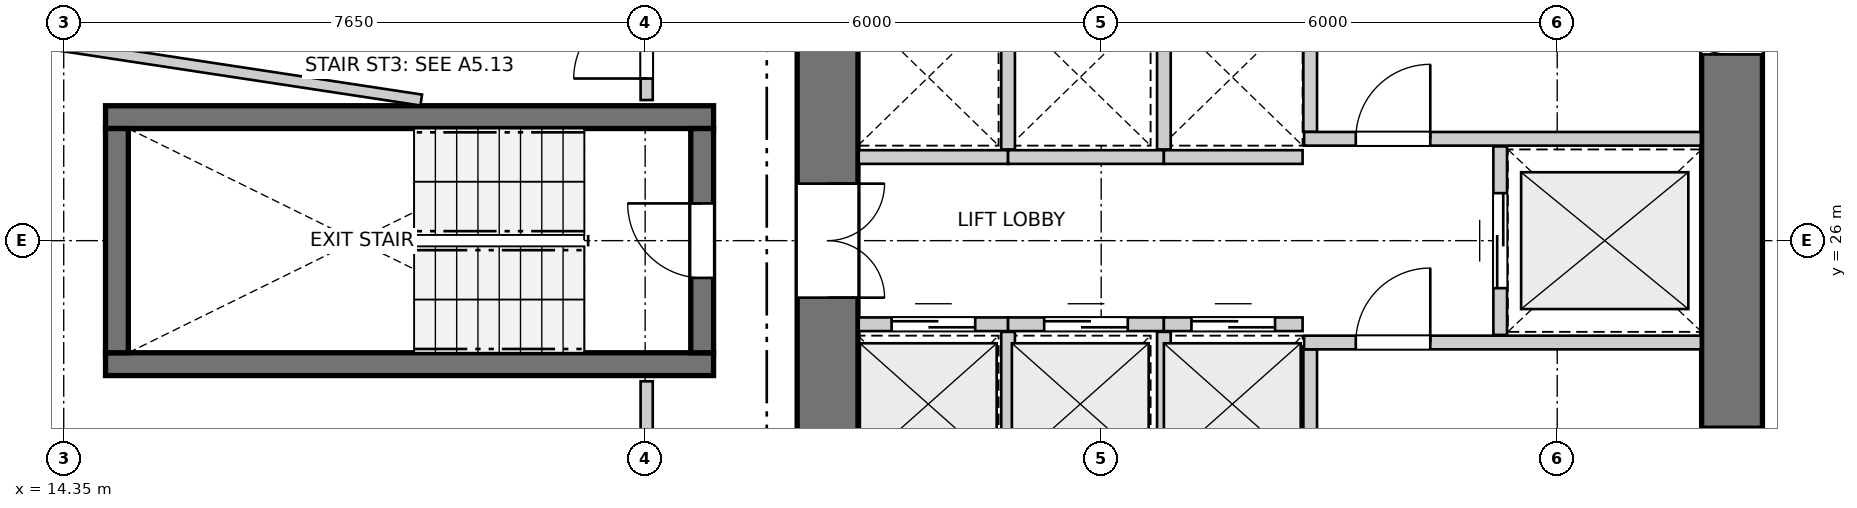
"""IFC4 building model, lengths in metres.
Left out: names, types, materials, properties, quantities, classifications, styles, units other than length and angle.
Written with IfcOpenShell. Run it as: python <this file> out.ifc"""

import sys

from ifc_helpers import new_model, si_unit, direction, frame, frame_2d, origin, place, context, subcontext, project, spatial, rectangle, extrude, source, transform, mapped, element, fill, save


model = new_model("IFC4")
c1 = context("Model", 3, precision=1e-05, world=origin(), true_north=direction((0.0, 1.0)))
c2 = subcontext(c1, "Body", "Model", "MODEL_VIEW")
j1 = project(units=[si_unit("LENGTHUNIT", "METRE"), si_unit("PLANEANGLEUNIT", "RADIAN")], contexts=[c1])
p1 = place(None, origin())
s1 = spatial("IfcSite", under=j1, at=p1, CompositionType="ELEMENT")
p2 = place(p1, origin())
s2 = spatial("IfcBuilding", under=s1, at=p2, CompositionType="ELEMENT")
p3 = place(p2, frame((0.0, 0.0, 62.2)))
s3 = spatial("IfcBuildingStorey", under=s2, at=p3, CompositionType="ELEMENT", Elevation=62.2)
p4 = place(p3, frame((24.4, 33.8, 0.0), z_axis=(0.0, 0.0, 1.0), x_axis=(0.0, -1.0, 0.0)))
e1 = element("IfcWall", 1, at=p4, inside=s3, PredefinedType="SHEAR", context=c2, shape_type="SweptSolid", body=[
    extrude(rectangle(XDim=15.6, YDim=0.8, at=frame_2d((7.8, 0.0))), origin(), (0.0, 0.0, 1.0), 2.9),
])
p5 = place(p4, frame((7.05, 0.0, 0.0)))
e2 = element("IfcOpeningElement", 2, at=p5, cuts=e1, PredefinedType="OPENING", context=c2, shape_type="SweptSolid", body=[
    extrude(rectangle(XDim=1.5, YDim=2.15, at=frame_2d((0.75, 1.075))), frame((0.0, 0.41, 0.0), z_axis=(0.0, -1.0, 0.0), x_axis=(1.0, 0.0, 0.0)), (0.0, 0.0, 1.0), 0.82),
])
p6 = place(p4, frame((3.52, 0.0, 0.0)))
e3 = element("IfcOpeningElement", 3, at=p6, cuts=e1, PredefinedType="OPENING", context=c2, shape_type="SweptSolid", body=[
    extrude(rectangle(XDim=0.86, YDim=2.05, at=frame_2d((0.43, 1.025))), frame((0.0, 0.41, 0.0), z_axis=(0.0, -1.0, 0.0), x_axis=(1.0, 0.0, 0.0)), (0.0, 0.0, 1.0), 0.82),
])
p7 = place(p4, frame((11.22, 0.0, 0.0)))
e4 = element("IfcOpeningElement", 4, at=p7, cuts=e1, PredefinedType="OPENING", context=c2, shape_type="SweptSolid", body=[
    extrude(rectangle(XDim=0.86, YDim=2.05, at=frame_2d((0.43, 1.025))), frame((0.0, 0.41, 0.0), z_axis=(0.0, -1.0, 0.0), x_axis=(1.0, 0.0, 0.0)), (0.0, 0.0, 1.0), 0.82),
])
p8 = place(p3, frame((36.3, 18.2, 0.0), z_axis=(0.0, 0.0, 1.0), x_axis=(0.0, 1.0, 0.0)))
e5 = element("IfcWall", 5, at=p8, inside=s3, PredefinedType="SHEAR", context=c2, shape_type="SweptSolid", body=[
    extrude(rectangle(XDim=15.6, YDim=0.8, at=frame_2d((7.8, 0.0))), origin(), (0.0, 0.0, 1.0), 2.9),
])
p9 = place(p8, frame((4.25, 0.0, 0.0)))
e6 = element("IfcOpeningElement", 6, at=p9, cuts=e5, PredefinedType="OPENING", context=c2, shape_type="SweptSolid", body=[
    extrude(rectangle(XDim=1.1, YDim=2.15, at=frame_2d((0.55, 1.075))), frame((0.0, 0.41, 0.0), z_axis=(0.0, -1.0, 0.0), x_axis=(1.0, 0.0, 0.0)), (0.0, 0.0, 1.0), 0.82),
])
p10 = place(p8, frame((10.25, 0.0, 0.0)))
e7 = element("IfcOpeningElement", 7, at=p10, cuts=e5, PredefinedType="OPENING", context=c2, shape_type="SweptSolid", body=[
    extrude(rectangle(XDim=1.1, YDim=2.15, at=frame_2d((0.55, 1.075))), frame((0.0, 0.41, 0.0), z_axis=(0.0, -1.0, 0.0), x_axis=(1.0, 0.0, 0.0)), (0.0, 0.0, 1.0), 0.82),
])
for number, where, z_axis, x_axis in (
    (8, (14.9, 24.375, 0.0), (0.0, 0.0, 1.0), (1.0, 0.0, 0.0)),
    (9, (22.9, 27.625, 0.0), (0.0, 0.0, 1.0), (-1.0, 0.0, 0.0)),
):
    element("IfcWall", number, at=place(p3, frame(where, z_axis=z_axis, x_axis=x_axis)), inside=s3, PredefinedType="SHEAR", context=c2, shape_type="SweptSolid", body=[
        extrude(rectangle(XDim=8.0, YDim=0.3, at=frame_2d((4.0, 0.0))), origin(), (0.0, 0.0, 1.0), 2.9),
    ])
p11 = place(p3, frame((15.05, 27.475, 0.0), z_axis=(0.0, 0.0, 1.0), x_axis=(0.0, -1.0, 0.0)))
e10 = element("IfcWall", 10, at=p11, inside=s3, PredefinedType="SHEAR", context=c2, shape_type="SweptSolid", body=[
    extrude(rectangle(XDim=2.95, YDim=0.3, at=frame_2d((1.475, 0.0))), origin(), (0.0, 0.0, 1.0), 2.9),
])
p12 = place(p3, frame((22.75, 24.525, 0.0), z_axis=(0.0, 0.0, 1.0), x_axis=(0.0, 1.0, 0.0)))
e11 = element("IfcWall", 11, at=p12, inside=s3, PredefinedType="SHEAR", context=c2, shape_type="SweptSolid", body=[
    extrude(rectangle(XDim=2.95, YDim=0.3, at=frame_2d((1.475, 0.0))), origin(), (0.0, 0.0, 1.0), 2.9),
])
p13 = place(p12, frame((0.985, 0.0, 0.0)))
e12 = element("IfcOpeningElement", 12, at=p13, cuts=e11, PredefinedType="OPENING", context=c2, shape_type="SweptSolid", body=[
    extrude(rectangle(XDim=0.98, YDim=2.15, at=frame_2d((0.49, 1.075))), frame((0.0, 0.16, 0.0), z_axis=(0.0, -1.0, 0.0), x_axis=(1.0, 0.0, 0.0)), (0.0, 0.0, 1.0), 0.32),
])
p14 = place(p3, frame((30.75, 21.46, 0.0), z_axis=(0.0, 0.0, 1.0), x_axis=(0.0, 1.0, 0.0)))
e13 = element("IfcWall", 13, at=p14, inside=s3, PredefinedType="PARTITIONING", context=c2, shape_type="SweptSolid", body=[
    extrude(rectangle(XDim=3.11, YDim=0.18, at=frame_2d((1.555, 0.0))), origin(), (0.0, 0.0, 1.0), 2.9),
])
p15 = place(p14, frame((0.26, 0.0, 0.0)))
e14 = element("IfcOpeningElement", 14, at=p15, cuts=e13, PredefinedType="OPENING", context=c2, shape_type="SweptSolid", body=[
    extrude(rectangle(XDim=0.86, YDim=2.05, at=frame_2d((0.43, 1.025))), frame((0.0, 0.1, 0.0), z_axis=(0.0, -1.0, 0.0), x_axis=(1.0, 0.0, 0.0)), (0.0, 0.0, 1.0), 0.2),
])
p16 = place(p3, frame((30.67, 24.66, 0.0), z_axis=(0.0, 0.0, 1.0), x_axis=(1.0, 0.0, 0.0)))
e15 = element("IfcWall", 15, at=p16, inside=s3, PredefinedType="PARTITIONING", context=c2, shape_type="SweptSolid", body=[
    extrude(rectangle(XDim=5.22, YDim=0.18, at=frame_2d((2.61, 0.0))), origin(), (0.0, 0.0, 1.0), 2.9),
])
p17 = place(p16, frame((0.68, 0.0, 0.0)))
e16 = element("IfcOpeningElement", 16, at=p17, cuts=e15, PredefinedType="OPENING", context=c2, shape_type="SweptSolid", body=[
    extrude(rectangle(XDim=0.98, YDim=2.15, at=frame_2d((0.49, 1.075))), frame((0.0, 0.1, 0.0), z_axis=(0.0, -1.0, 0.0), x_axis=(1.0, 0.0, 0.0)), (0.0, 0.0, 1.0), 0.2),
])
p18 = place(p3, frame((30.75, 27.43, 0.0), z_axis=(0.0, 0.0, 1.0), x_axis=(0.0, 1.0, 0.0)))
e17 = element("IfcWall", 17, at=p18, inside=s3, PredefinedType="PARTITIONING", context=c2, shape_type="SweptSolid", body=[
    extrude(rectangle(XDim=3.11, YDim=0.18, at=frame_2d((1.555, 0.0))), origin(), (0.0, 0.0, 1.0), 2.9),
])
p19 = place(p18, frame((1.98, 0.0, 0.0)))
e18 = element("IfcOpeningElement", 18, at=p19, cuts=e17, PredefinedType="OPENING", context=c2, shape_type="SweptSolid", body=[
    extrude(rectangle(XDim=0.86, YDim=2.05, at=frame_2d((0.43, 1.025))), frame((0.0, 0.1, 0.0), z_axis=(0.0, -1.0, 0.0), x_axis=(1.0, 0.0, 0.0)), (0.0, 0.0, 1.0), 0.2),
])
p20 = place(p3, frame((30.67, 27.34, 0.0), z_axis=(0.0, 0.0, 1.0), x_axis=(1.0, 0.0, 0.0)))
e19 = element("IfcWall", 19, at=p20, inside=s3, PredefinedType="PARTITIONING", context=c2, shape_type="SweptSolid", body=[
    extrude(rectangle(XDim=5.22, YDim=0.18, at=frame_2d((2.61, 0.0))), origin(), (0.0, 0.0, 1.0), 2.9),
])
p21 = place(p20, frame((0.68, 0.0, 0.0)))
e20 = element("IfcOpeningElement", 20, at=p21, cuts=e19, PredefinedType="OPENING", context=c2, shape_type="SweptSolid", body=[
    extrude(rectangle(XDim=0.98, YDim=2.15, at=frame_2d((0.49, 1.075))), frame((0.0, 0.1, 0.0), z_axis=(0.0, -1.0, 0.0), x_axis=(1.0, 0.0, 0.0)), (0.0, 0.0, 1.0), 0.2),
])
p22 = place(p3, frame((33.25, 24.76, 0.0), z_axis=(0.0, 0.0, 1.0), x_axis=(0.0, 1.0, 0.0)))
e21 = element("IfcWall", 21, at=p22, inside=s3, PredefinedType="PARTITIONING", context=c2, shape_type="SweptSolid", body=[
    extrude(rectangle(XDim=2.48, YDim=0.18, at=frame_2d((1.24, 0.0))), origin(), (0.0, 0.0, 1.0), 2.9),
])
p23 = place(p22, frame((0.615, 0.0, 0.0)))
e22 = element("IfcOpeningElement", 22, at=p23, cuts=e21, PredefinedType="OPENING", context=c2, shape_type="SweptSolid", body=[
    extrude(rectangle(XDim=1.25, YDim=2.15, at=frame_2d((0.625, 1.075))), frame((0.0, 0.1, 0.0), z_axis=(0.0, -1.0, 0.0), x_axis=(1.0, 0.0, 0.0)), (0.0, 0.0, 1.0), 0.2),
])
p24 = place(p3, frame((24.81, 24.9, 0.0), z_axis=(0.0, 0.0, 1.0), x_axis=(1.0, 0.0, 0.0)))
e23 = element("IfcWall", 23, at=p24, inside=s3, PredefinedType="PARTITIONING", context=c2, shape_type="SweptSolid", body=[
    extrude(rectangle(XDim=1.965, YDim=0.18, at=frame_2d((0.982, 0.0))), origin(), (0.0, 0.0, 1.0), 2.9),
])
p25 = place(p24, frame((0.433, 0.0, 0.0)))
e24 = element("IfcOpeningElement", 24, at=p25, cuts=e23, PredefinedType="OPENING", context=c2, shape_type="SweptSolid", body=[
    extrude(rectangle(XDim=1.1, YDim=2.15, at=frame_2d((0.55, 1.075))), frame((0.0, 0.1, 0.0), z_axis=(0.0, -1.0, 0.0), x_axis=(1.0, 0.0, 0.0)), (0.0, 0.0, 1.0), 0.2),
])
p26 = place(p3, frame((26.775, 24.9, 0.0), z_axis=(0.0, 0.0, 1.0), x_axis=(1.0, 0.0, 0.0)))
e25 = element("IfcWall", 25, at=p26, inside=s3, PredefinedType="PARTITIONING", context=c2, shape_type="SweptSolid", body=[
    extrude(rectangle(XDim=2.05, YDim=0.18, at=frame_2d((1.025, 0.0))), origin(), (0.0, 0.0, 1.0), 2.9),
])
p27 = place(p26, frame((0.475, 0.0, 0.0)))
e26 = element("IfcOpeningElement", 26, at=p27, cuts=e25, PredefinedType="OPENING", context=c2, shape_type="SweptSolid", body=[
    extrude(rectangle(XDim=1.1, YDim=2.15, at=frame_2d((0.55, 1.075))), frame((0.0, 0.1, 0.0), z_axis=(0.0, -1.0, 0.0), x_axis=(1.0, 0.0, 0.0)), (0.0, 0.0, 1.0), 0.2),
])
p28 = place(p3, frame((26.775, 23.02, 0.0), z_axis=(0.0, 0.0, 1.0), x_axis=(0.0, 1.0, 0.0)))
e27 = element("IfcWall", 27, at=p28, inside=s3, PredefinedType="PARTITIONING", context=c2, shape_type="SweptSolid", body=[
    extrude(rectangle(XDim=1.78, YDim=0.18, at=frame_2d((0.89, 0.0))), origin(), (0.0, 0.0, 1.0), 2.9),
])
p29 = place(p3, frame((28.825, 24.9, 0.0), z_axis=(0.0, 0.0, 1.0), x_axis=(1.0, 0.0, 0.0)))
e28 = element("IfcWall", 28, at=p29, inside=s3, PredefinedType="PARTITIONING", context=c2, shape_type="SweptSolid", body=[
    extrude(rectangle(XDim=1.825, YDim=0.18, at=frame_2d((0.913, 0.0))), origin(), (0.0, 0.0, 1.0), 2.9),
])
p30 = place(p29, frame((0.363, 0.0, 0.0)))
e29 = element("IfcOpeningElement", 29, at=p30, cuts=e28, PredefinedType="OPENING", context=c2, shape_type="SweptSolid", body=[
    extrude(rectangle(XDim=1.1, YDim=2.15, at=frame_2d((0.55, 1.075))), frame((0.0, 0.1, 0.0), z_axis=(0.0, -1.0, 0.0), x_axis=(1.0, 0.0, 0.0)), (0.0, 0.0, 1.0), 0.2),
])
p31 = place(p3, frame((28.825, 23.02, 0.0), z_axis=(0.0, 0.0, 1.0), x_axis=(0.0, 1.0, 0.0)))
e30 = element("IfcWall", 30, at=p31, inside=s3, PredefinedType="PARTITIONING", context=c2, shape_type="SweptSolid", body=[
    extrude(rectangle(XDim=1.78, YDim=0.18, at=frame_2d((0.89, 0.0))), origin(), (0.0, 0.0, 1.0), 2.9),
])
p32 = place(p3, frame((24.81, 27.1, 0.0), z_axis=(0.0, 0.0, 1.0), x_axis=(1.0, 0.0, 0.0)))
e31 = element("IfcWall", 31, at=p32, inside=s3, PredefinedType="PARTITIONING", context=c2, shape_type="SweptSolid", body=[
    extrude(rectangle(XDim=1.965, YDim=0.18, at=frame_2d((0.982, 0.0))), origin(), (0.0, 0.0, 1.0), 2.9),
])
p33 = place(p3, frame((26.775, 27.1, 0.0), z_axis=(0.0, 0.0, 1.0), x_axis=(1.0, 0.0, 0.0)))
e32 = element("IfcWall", 32, at=p33, inside=s3, PredefinedType="PARTITIONING", context=c2, shape_type="SweptSolid", body=[
    extrude(rectangle(XDim=2.05, YDim=0.18, at=frame_2d((1.025, 0.0))), origin(), (0.0, 0.0, 1.0), 2.9),
])
p34 = place(p3, frame((26.775, 27.2, 0.0), z_axis=(0.0, 0.0, 1.0), x_axis=(0.0, 1.0, 0.0)))
e33 = element("IfcWall", 33, at=p34, inside=s3, PredefinedType="PARTITIONING", context=c2, shape_type="SweptSolid", body=[
    extrude(rectangle(XDim=1.78, YDim=0.18, at=frame_2d((0.89, 0.0))), origin(), (0.0, 0.0, 1.0), 2.9),
])
p35 = place(p3, frame((28.825, 27.1, 0.0), z_axis=(0.0, 0.0, 1.0), x_axis=(1.0, 0.0, 0.0)))
e34 = element("IfcWall", 34, at=p35, inside=s3, PredefinedType="PARTITIONING", context=c2, shape_type="SweptSolid", body=[
    extrude(rectangle(XDim=1.825, YDim=0.18, at=frame_2d((0.913, 0.0))), origin(), (0.0, 0.0, 1.0), 2.9),
])
p36 = place(p3, frame((28.825, 27.2, 0.0), z_axis=(0.0, 0.0, 1.0), x_axis=(0.0, 1.0, 0.0)))
e35 = element("IfcWall", 35, at=p36, inside=s3, PredefinedType="PARTITIONING", context=c2, shape_type="SweptSolid", body=[
    extrude(rectangle(XDim=1.78, YDim=0.18, at=frame_2d((0.89, 0.0))), origin(), (0.0, 0.0, 1.0), 2.9),
])
p37 = place(p3, frame((22.02, 21.168, 0.0), z_axis=(0.0, 0.0, 1.0), x_axis=(0.0, 1.0, 0.0)))
e36 = element("IfcWall", 36, at=p37, inside=s3, PredefinedType="PARTITIONING", context=c2, shape_type="SweptSolid", body=[
    extrude(rectangle(XDim=2.982, YDim=0.16, at=frame_2d((1.491, 0.0))), origin(), (0.0, 0.0, 1.0), 2.9),
])
p38 = place(p37, frame((0.887, 0.0, 0.0)))
e37 = element("IfcOpeningElement", 37, at=p38, cuts=e36, PredefinedType="OPENING", context=c2, shape_type="SweptSolid", body=[
    extrude(rectangle(XDim=1.3, YDim=2.1, at=frame_2d((0.65, 1.05))), frame((0.0, 0.09, 0.0), z_axis=(0.0, -1.0, 0.0), x_axis=(1.0, 0.0, 0.0)), (0.0, 0.0, 1.0), 0.18),
])
p39 = place(p3, frame((22.02, 27.85, 0.0), z_axis=(0.0, 0.0, 1.0), x_axis=(0.0, 1.0, 0.0)))
e38 = element("IfcWall", 38, at=p39, inside=s3, PredefinedType="PARTITIONING", context=c2, shape_type="SweptSolid", body=[
    extrude(rectangle(XDim=1.463, YDim=0.16, at=frame_2d((0.731, 0.0))), origin(), (0.0, 0.0, 1.0), 2.9),
])
p40 = place(p39, frame((0.283, 0.0, 0.0)))
e39 = element("IfcOpeningElement", 39, at=p40, cuts=e38, PredefinedType="OPENING", context=c2, shape_type="SweptSolid", body=[
    extrude(rectangle(XDim=0.96, YDim=2.1, at=frame_2d((0.48, 1.05))), frame((0.0, 0.09, 0.0), z_axis=(0.0, -1.0, 0.0), x_axis=(1.0, 0.0, 0.0)), (0.0, 0.0, 1.0), 0.18),
])
p41 = place(p3, frame((5.417, 29.918, 0.0), z_axis=(0.0, 0.0, 1.0), x_axis=(0.98869499802, -0.149940657898, 0.0)))
e40 = element("IfcWall", 40, at=p41, inside=s3, PredefinedType="PARTITIONING", context=c2, shape_type="SweptSolid", body=[
    extrude(rectangle(XDim=13.793, YDim=0.145, at=frame_2d((6.896, 0.0))), origin(), (0.0, 0.0, 1.0), 2.9),
])
m1 = source(origin(), c2, "Body", "SweptSolid", [
    extrude(rectangle(XDim=0.98, YDim=2.15, at=frame_2d((0.49, 1.075))), frame((0.0, 0.025, 0.0), z_axis=(0.0, -1.0, 0.0), x_axis=(1.0, 0.0, 0.0)), (0.0, 0.0, 1.0), 0.05),
])
p42 = place(p13, origin())
e41 = element("IfcDoor", 41, at=p42, inside=s3, OperationType="SINGLE_SWING_RIGHT", PredefinedType="DOOR", context=c2, shape_type="MappedRepresentation", body=[
    mapped(m1, transform((0.0, 0.0, 0.0), x_axis=(1.0, 0.0, 0.0), y_axis=(0.0, 1.0, 0.0), z_axis=(0.0, 0.0, 1.0), scale=1.0)),
])
fill(e12, e41)
m2 = source(origin(), c2, "Body", "SweptSolid", [
    extrude(rectangle(XDim=1.1, YDim=2.15, at=frame_2d((0.55, 1.075))), frame((0.0, 0.025, 0.0), z_axis=(0.0, -1.0, 0.0), x_axis=(1.0, 0.0, 0.0)), (0.0, 0.0, 1.0), 0.05),
])
p43 = place(p9, origin())
e42 = element("IfcDoor", 42, at=p43, inside=s3, OperationType="SINGLE_SWING_LEFT", PredefinedType="DOOR", context=c2, shape_type="MappedRepresentation", body=[
    mapped(m2, transform((0.0, 0.0, 0.0), x_axis=(1.0, 0.0, 0.0), y_axis=(0.0, 1.0, 0.0), z_axis=(0.0, 0.0, 1.0), scale=1.0)),
])
fill(e6, e42)
p44 = place(p10, origin())
e43 = element("IfcDoor", 43, at=p44, inside=s3, OperationType="SINGLE_SWING_RIGHT", PredefinedType="DOOR", context=c2, shape_type="MappedRepresentation", body=[
    mapped(m2, transform((0.0, 0.0, 0.0), x_axis=(1.0, 0.0, 0.0), y_axis=(0.0, 1.0, 0.0), z_axis=(0.0, 0.0, 1.0), scale=1.0)),
])
fill(e7, e43)
m3 = source(origin(), c2, "Body", "SweptSolid", [
    extrude(rectangle(XDim=1.5, YDim=2.15, at=frame_2d((0.75, 1.075))), frame((0.0, 0.025, 0.0), z_axis=(0.0, -1.0, 0.0), x_axis=(1.0, 0.0, 0.0)), (0.0, 0.0, 1.0), 0.05),
])
p45 = place(p5, origin())
e44 = element("IfcDoor", 44, at=p45, inside=s3, OperationType="DOUBLE_DOOR_SINGLE_SWING", PredefinedType="DOOR", context=c2, shape_type="MappedRepresentation", body=[
    mapped(m3, transform((0.0, 0.0, 0.0), x_axis=(1.0, 0.0, 0.0), y_axis=(0.0, 1.0, 0.0), z_axis=(0.0, 0.0, 1.0), scale=1.0)),
])
fill(e2, e44)
p46 = place(p17, origin())
e45 = element("IfcDoor", 45, at=p46, inside=s3, OperationType="SINGLE_SWING_RIGHT", PredefinedType="DOOR", context=c2, shape_type="MappedRepresentation", body=[
    mapped(m1, transform((0.0, 0.0, 0.0), x_axis=(1.0, 0.0, 0.0), y_axis=(0.0, 1.0, 0.0), z_axis=(0.0, 0.0, 1.0), scale=1.0)),
])
fill(e16, e45)
p47 = place(p21, origin())
e46 = element("IfcDoor", 46, at=p47, inside=s3, OperationType="SINGLE_SWING_RIGHT", PredefinedType="DOOR", context=c2, shape_type="MappedRepresentation", body=[
    mapped(m1, transform((0.0, 0.0, 0.0), x_axis=(1.0, 0.0, 0.0), y_axis=(0.0, 1.0, 0.0), z_axis=(0.0, 0.0, 1.0), scale=1.0)),
])
fill(e20, e46)
m4 = source(origin(), c2, "Body", "SweptSolid", [
    extrude(rectangle(XDim=1.25, YDim=2.15, at=frame_2d((0.625, 1.075))), frame((0.0, 0.025, 0.0), z_axis=(0.0, -1.0, 0.0), x_axis=(1.0, 0.0, 0.0)), (0.0, 0.0, 1.0), 0.05),
])
p48 = place(p23, origin())
e47 = element("IfcDoor", 47, at=p48, inside=s3, OperationType="DOUBLE_DOOR_SLIDING", PredefinedType="DOOR", context=c2, shape_type="MappedRepresentation", body=[
    mapped(m4, transform((0.0, 0.0, 0.0), x_axis=(1.0, 0.0, 0.0), y_axis=(0.0, 1.0, 0.0), z_axis=(0.0, 0.0, 1.0), scale=1.0)),
])
fill(e22, e47)
p49 = place(p25, origin())
e48 = element("IfcDoor", 48, at=p49, inside=s3, OperationType="DOUBLE_DOOR_SLIDING", PredefinedType="DOOR", context=c2, shape_type="MappedRepresentation", body=[
    mapped(m2, transform((0.0, 0.0, 0.0), x_axis=(1.0, 0.0, 0.0), y_axis=(0.0, 1.0, 0.0), z_axis=(0.0, 0.0, 1.0), scale=1.0)),
])
fill(e24, e48)
p50 = place(p27, origin())
e49 = element("IfcDoor", 49, at=p50, inside=s3, OperationType="DOUBLE_DOOR_SLIDING", PredefinedType="DOOR", context=c2, shape_type="MappedRepresentation", body=[
    mapped(m2, transform((0.0, 0.0, 0.0), x_axis=(1.0, 0.0, 0.0), y_axis=(0.0, 1.0, 0.0), z_axis=(0.0, 0.0, 1.0), scale=1.0)),
])
fill(e26, e49)
p51 = place(p30, origin())
e50 = element("IfcDoor", 50, at=p51, inside=s3, OperationType="DOUBLE_DOOR_SLIDING", PredefinedType="DOOR", context=c2, shape_type="MappedRepresentation", body=[
    mapped(m2, transform((0.0, 0.0, 0.0), x_axis=(1.0, 0.0, 0.0), y_axis=(0.0, 1.0, 0.0), z_axis=(0.0, 0.0, 1.0), scale=1.0)),
])
fill(e29, e50)
m5 = source(origin(), c2, "Body", "SweptSolid", [
    extrude(rectangle(XDim=0.96, YDim=2.1, at=frame_2d((0.48, 1.05))), frame((0.0, 0.025, 0.0), z_axis=(0.0, -1.0, 0.0), x_axis=(1.0, 0.0, 0.0)), (0.0, 0.0, 1.0), 0.05),
])
p52 = place(p40, origin())
e51 = element("IfcDoor", 51, at=p52, inside=s3, OperationType="SINGLE_SWING_LEFT", PredefinedType="DOOR", context=c2, shape_type="MappedRepresentation", body=[
    mapped(m5, transform((0.0, 0.0, 0.0), x_axis=(1.0, 0.0, 0.0), y_axis=(0.0, 1.0, 0.0), z_axis=(0.0, 0.0, 1.0), scale=1.0)),
])
fill(e39, e51)
save(model, sys.argv[1])
